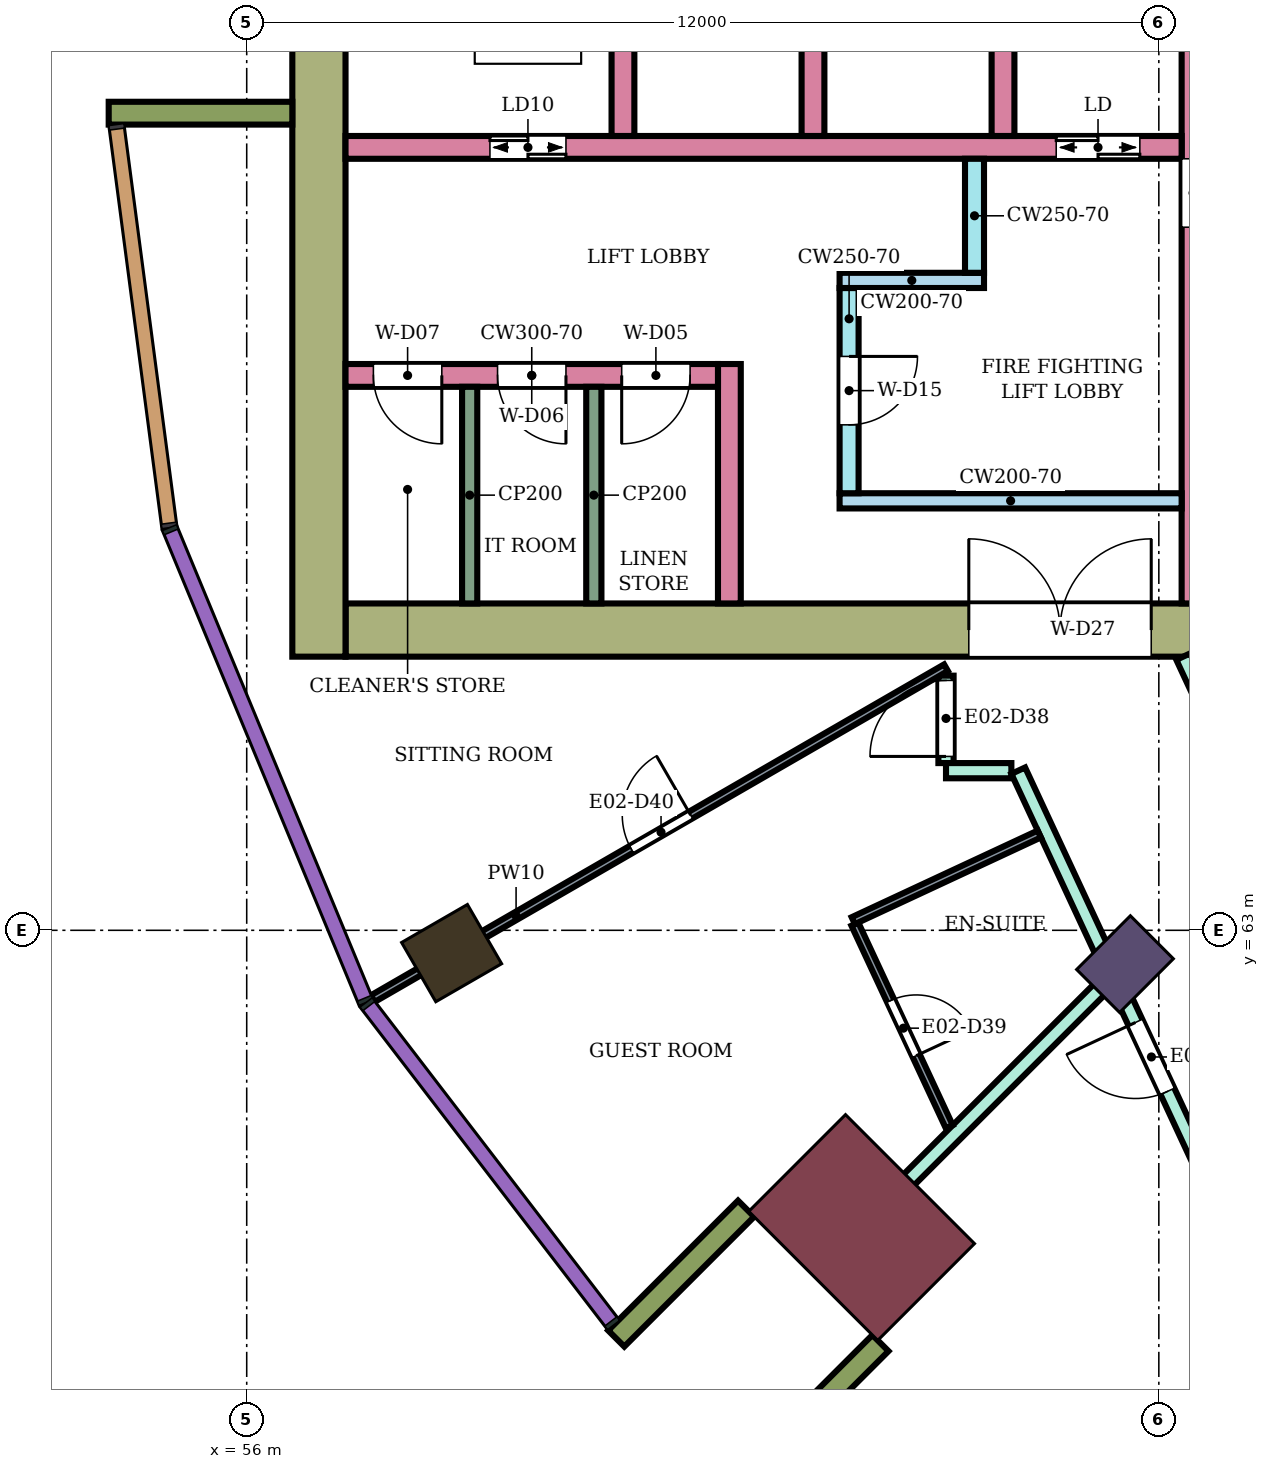
"""IFC4 building model, lengths in metres.
Left out: names, types, materials, properties, quantities, classifications, styles, units other than length and angle.
Written with IfcOpenShell. Run it as: python <this file> out.ifc"""

import sys

from ifc_helpers import new_model, si_unit, direction, frame, frame_2d, origin, origin_2d, place, context, subcontext, project, spatial, rectangle, extrude, element, fill, save


model = new_model("IFC4")
c1 = context("Model", 3, precision=1e-05, world=origin(), true_north=direction((0.0, 1.0)))
c2 = subcontext(c1, "Body", "Model", "MODEL_VIEW")
j1 = project(units=[si_unit("LENGTHUNIT", "METRE"), si_unit("PLANEANGLEUNIT", "RADIAN")], contexts=[c1])
p1 = place(None, origin())
s1 = spatial("IfcSite", under=j1, at=p1, CompositionType="ELEMENT")
p2 = place(p1, origin())
s2 = spatial("IfcBuilding", under=s1, at=p2, CompositionType="ELEMENT")
p3 = place(p2, frame((0.0, 0.0, 126.3)))
s3 = spatial("IfcBuildingStorey", under=s2, at=p3, CompositionType="ELEMENT", Elevation=126.3)
p4 = place(p3, frame((58.696, 62.7, 0.0), z_axis=(0.0, 0.0, 1.0), x_axis=(-0.866025403784, -0.5, 0.0)))
e1 = element("IfcColumn", 1, at=p4, inside=s3, PredefinedType="COLUMN", context=c2, shape_type="SweptSolid", body=[
    extrude(rectangle(XDim=1.0, YDim=0.9, at=origin_2d()), origin(), (0.0, 0.0, 1.0), 3.9),
])
p5 = place(p3, frame((67.555, 62.555, 0.0), z_axis=(0.0, 0.0, 1.0), x_axis=(-0.707106781187, -0.707106781187, 0.0)))
e2 = element("IfcColumn", 2, at=p5, inside=s3, PredefinedType="COLUMN", context=c2, shape_type="SweptSolid", body=[
    extrude(rectangle(XDim=1.0, YDim=0.8, at=origin_2d()), origin(), (0.0, 0.0, 1.0), 3.9),
])
p6 = place(p3, frame((64.09, 59.09, 0.0), z_axis=(0.0, 0.0, 1.0), x_axis=(-0.707106781187, -0.707106781187, 0.0)))
e3 = element("IfcColumn", 3, at=p6, inside=s3, PredefinedType="COLUMN", context=c2, shape_type="SweptSolid", body=[
    extrude(rectangle(XDim=1.8, YDim=2.4, at=origin_2d()), origin(), (0.0, 0.0, 1.0), 3.9),
])
p7 = place(p3, frame((72.1, 66.95, 0.0), z_axis=(0.0, 0.0, 1.0), x_axis=(-1.0, 0.0, 0.0)))
e4 = element("IfcWall", 4, at=p7, inside=s3, PredefinedType="SHEAR", context=c2, shape_type="SweptSolid", body=[
    extrude(rectangle(XDim=14.8, YDim=0.7, at=frame_2d((7.4, 0.0))), origin(), (0.0, 0.0, 1.0), 3.58),
])
p8 = place(p7, frame((4.2, 0.0, 0.0)))
e5 = element("IfcOpeningElement", 5, at=p8, cuts=e4, PredefinedType="OPENING", context=c2, shape_type="SweptSolid", body=[
    extrude(rectangle(XDim=2.4, YDim=2.4, at=frame_2d((1.2, 1.2))), frame((0.0, 0.36, 0.0), z_axis=(0.0, -1.0, 0.0), x_axis=(1.0, 0.0, 0.0)), (0.0, 0.0, 1.0), 0.72),
])
p9 = place(p3, frame((56.95, 83.4, 0.0), z_axis=(0.0, 0.0, 1.0), x_axis=(0.0, -1.0, 0.0)))
e6 = element("IfcWall", 6, at=p9, inside=s3, PredefinedType="SHEAR", context=c2, shape_type="SweptSolid", body=[
    extrude(rectangle(XDim=16.8, YDim=0.7, at=frame_2d((8.4, 0.0))), origin(), (0.0, 0.0, 1.0), 3.58),
])
p10 = place(p3, frame((68.45, 75.0, 0.0), z_axis=(0.0, 0.0, 1.0), x_axis=(0.0, -1.0, 0.0)))
e7 = element("IfcWall", 7, at=p10, inside=s3, PredefinedType="SHEAR", context=c2, shape_type="SweptSolid", body=[
    extrude(rectangle(XDim=7.7, YDim=0.3, at=frame_2d((3.85, 0.0))), origin(), (0.0, 0.0, 1.0), 3.58),
])
p11 = place(p10, frame((1.85, 0.0, 0.0)))
e8 = element("IfcOpeningElement", 8, at=p11, cuts=e7, PredefinedType="OPENING", context=c2, shape_type="SweptSolid", body=[
    extrude(rectangle(XDim=0.9, YDim=2.1, at=frame_2d((0.45, 1.05))), frame((0.0, 0.16, 0.0), z_axis=(0.0, -1.0, 0.0), x_axis=(1.0, 0.0, 0.0)), (0.0, 0.0, 1.0), 0.32),
])
p12 = place(p3, frame((68.3, 73.3, 0.0), z_axis=(0.0, 0.0, 1.0), x_axis=(-1.0, 0.0, 0.0)))
e9 = element("IfcWall", 9, at=p12, inside=s3, PredefinedType="SHEAR", context=c2, shape_type="SweptSolid", body=[
    extrude(rectangle(XDim=11.0, YDim=0.3, at=frame_2d((5.5, 0.0))), origin(), (0.0, 0.0, 1.0), 3.58),
])
p13 = place(p12, frame((0.55, 0.0, 0.0)))
e10 = element("IfcOpeningElement", 10, at=p13, cuts=e9, PredefinedType="OPENING", context=c2, shape_type="SweptSolid", body=[
    extrude(rectangle(XDim=1.1, YDim=2.1, at=frame_2d((0.55, 1.05))), frame((0.0, 0.16, 0.0), z_axis=(0.0, -1.0, 0.0), x_axis=(1.0, 0.0, 0.0)), (0.0, 0.0, 1.0), 0.32),
])
p14 = place(p12, frame((8.1, 0.0, 0.0)))
e11 = element("IfcOpeningElement", 11, at=p14, cuts=e9, PredefinedType="OPENING", context=c2, shape_type="SweptSolid", body=[
    extrude(rectangle(XDim=1.0, YDim=2.1, at=frame_2d((0.5, 1.05))), frame((0.0, 0.16, 0.0), z_axis=(0.0, -1.0, 0.0), x_axis=(1.0, 0.0, 0.0)), (0.0, 0.0, 1.0), 0.32),
])
for number, where, z_axis, x_axis in (
    (12, (65.95, 76.0, 0.0), (0.0, 0.0, 1.0), (0.0, -1.0, 0.0)),
    (13, (63.45, 76.0, 0.0), (0.0, 0.0, 1.0), (0.0, -1.0, 0.0)),
    (14, (60.95, 76.0, 0.0), (0.0, 0.0, 1.0), (0.0, -1.0, 0.0)),
):
    element("IfcWall", number, at=place(p3, frame(where, z_axis=z_axis, x_axis=x_axis)), inside=s3, PredefinedType="SHEAR", context=c2, shape_type="SweptSolid", body=[
        extrude(rectangle(XDim=2.55, YDim=0.3, at=frame_2d((1.275, 0.0))), origin(), (0.0, 0.0, 1.0), 3.58),
    ])
p15 = place(p3, frame((68.3, 68.65, 0.0), z_axis=(0.0, 0.0, 1.0), x_axis=(-1.0, 0.0, 0.0)))
e15 = element("IfcWall", 15, at=p15, inside=s3, PredefinedType="SHEAR", context=c2, shape_type="SweptSolid", body=[
    extrude(rectangle(XDim=4.5, YDim=0.2, at=frame_2d((2.25, 0.0))), origin(), (0.0, 0.0, 1.0), 3.58),
])
p16 = place(p3, frame((63.925, 71.45, 0.0), z_axis=(0.0, 0.0, 1.0), x_axis=(0.0, -1.0, 0.0)))
e16 = element("IfcWall", 16, at=p16, inside=s3, PredefinedType="SHEAR", context=c2, shape_type="SweptSolid", body=[
    extrude(rectangle(XDim=2.7, YDim=0.25, at=frame_2d((1.35, 0.0))), origin(), (0.0, 0.0, 1.0), 3.58),
])
p17 = place(p16, frame((0.9, 0.0, 0.0)))
e17 = element("IfcOpeningElement", 17, at=p17, cuts=e16, PredefinedType="OPENING", context=c2, shape_type="SweptSolid", body=[
    extrude(rectangle(XDim=0.9, YDim=2.1, at=frame_2d((0.45, 1.05))), frame((0.0, 0.135, 0.0), z_axis=(0.0, -1.0, 0.0), x_axis=(1.0, 0.0, 0.0)), (0.0, 0.0, 1.0), 0.27),
])
p18 = place(p3, frame((65.7, 71.55, 0.0), z_axis=(0.0, 0.0, 1.0), x_axis=(-1.0, 0.0, 0.0)))
e18 = element("IfcWall", 18, at=p18, inside=s3, PredefinedType="SHEAR", context=c2, shape_type="SweptSolid", body=[
    extrude(rectangle(XDim=1.9, YDim=0.2, at=frame_2d((0.95, 0.0))), origin(), (0.0, 0.0, 1.0), 3.58),
])
p19 = place(p3, frame((65.575, 73.15, 0.0), z_axis=(0.0, 0.0, 1.0), x_axis=(0.0, -1.0, 0.0)))
e19 = element("IfcWall", 19, at=p19, inside=s3, PredefinedType="SHEAR", context=c2, shape_type="SweptSolid", body=[
    extrude(rectangle(XDim=1.5, YDim=0.25, at=frame_2d((0.75, 0.0))), origin(), (0.0, 0.0, 1.0), 3.58),
])
p20 = place(p3, frame((62.35, 70.45, 0.0), z_axis=(0.0, 0.0, 1.0), x_axis=(0.0, -1.0, 0.0)))
e20 = element("IfcWall", 20, at=p20, inside=s3, PredefinedType="SHEAR", context=c2, shape_type="SweptSolid", body=[
    extrude(rectangle(XDim=3.15, YDim=0.3, at=frame_2d((1.575, 0.0))), origin(), (0.0, 0.0, 1.0), 3.58),
])
p21 = place(p3, frame((62.2, 70.3, 0.0), z_axis=(0.0, 0.0, 1.0), x_axis=(-1.0, 0.0, 0.0)))
e21 = element("IfcWall", 21, at=p21, inside=s3, PredefinedType="SHEAR", context=c2, shape_type="SweptSolid", body=[
    extrude(rectangle(XDim=4.9, YDim=0.3, at=frame_2d((2.45, 0.0))), origin(), (0.0, 0.0, 1.0), 3.58),
])
p22 = place(p21, frame((0.367, 0.0, 0.0)))
e22 = element("IfcOpeningElement", 22, at=p22, cuts=e21, PredefinedType="OPENING", context=c2, shape_type="SweptSolid", body=[
    extrude(rectangle(XDim=0.9, YDim=2.1, at=frame_2d((0.45, 1.05))), frame((0.0, 0.16, 0.0), z_axis=(0.0, -1.0, 0.0), x_axis=(1.0, 0.0, 0.0)), (0.0, 0.0, 1.0), 0.32),
])
p23 = place(p21, frame((2.0, 0.0, 0.0)))
e23 = element("IfcOpeningElement", 23, at=p23, cuts=e21, PredefinedType="OPENING", context=c2, shape_type="SweptSolid", body=[
    extrude(rectangle(XDim=0.9, YDim=2.1, at=frame_2d((0.45, 1.05))), frame((0.0, 0.16, 0.0), z_axis=(0.0, -1.0, 0.0), x_axis=(1.0, 0.0, 0.0)), (0.0, 0.0, 1.0), 0.32),
])
p24 = place(p21, frame((3.633, 0.0, 0.0)))
e24 = element("IfcOpeningElement", 24, at=p24, cuts=e21, PredefinedType="OPENING", context=c2, shape_type="SweptSolid", body=[
    extrude(rectangle(XDim=0.9, YDim=2.1, at=frame_2d((0.45, 1.05))), frame((0.0, 0.16, 0.0), z_axis=(0.0, -1.0, 0.0), x_axis=(1.0, 0.0, 0.0)), (0.0, 0.0, 1.0), 0.32),
])
for number, where, z_axis, x_axis in (
    (25, (56.6, 73.75, 0.0), (0.0, 0.0, 1.0), (-1.0, 0.0, 0.0)),
    (26, (62.57, 59.338, 0.0), (0.0, 0.0, 1.0), (-0.707, -0.707, 0.0)),
    (27, (64.338, 57.57, 0.0), (0.0, 0.0, 1.0), (-0.707, -0.707, 0.0)),
):
    element("IfcWall", number, at=place(p3, frame(where, z_axis=z_axis, x_axis=x_axis)), inside=s3, PredefinedType="NOTDEFINED", context=c2, shape_type="SweptSolid", body=[
        extrude(rectangle(XDim=2.416, YDim=0.3, at=frame_2d((1.208, 0.0))), origin(), (0.0, 0.0, 1.0), 3.9),
    ])
p25 = place(p3, frame((63.592, 58.599, 0.0), z_axis=(0.0, 0.0, 1.0), x_axis=(0.707292886396, 0.706920626982, 0.0)))
e28 = element("IfcWall", 28, at=p25, inside=s3, PredefinedType="PARTITIONING", context=c2, shape_type="SweptSolid", body=[
    extrude(rectangle(XDim=5.247, YDim=0.2, at=frame_2d((2.623, 0.0))), origin(), (0.0, 0.0, 1.0), 3.45),
])
p26 = place(p3, frame((65.2, 65.2, 0.0), z_axis=(0.0, 0.0, 1.0), x_axis=(0.0, 1.0, 0.0)))
e29 = element("IfcWall", 29, at=p26, inside=s3, PredefinedType="PARTITIONING", context=c2, shape_type="SweptSolid", body=[
    extrude(rectangle(XDim=1.15, YDim=0.2, at=frame_2d((0.575, 0.0))), origin(), (0.0, 0.0, 1.0), 3.45),
])
p27 = place(p26, frame((0.087, 0.0, 0.0)))
e30 = element("IfcOpeningElement", 30, at=p27, cuts=e29, PredefinedType="OPENING", context=c2, shape_type="SweptSolid", body=[
    extrude(rectangle(XDim=1.0, YDim=2.1, at=frame_2d((0.5, 1.05))), frame((0.0, 0.11, 0.0), z_axis=(0.0, -1.0, 0.0), x_axis=(1.0, 0.0, 0.0)), (0.0, 0.0, 1.0), 0.22),
])
p28 = place(p3, frame((65.2, 65.1, 0.0), z_axis=(0.0, 0.0, 1.0), x_axis=(1.0, 0.0, 0.0)))
e31 = element("IfcWall", 31, at=p28, inside=s3, PredefinedType="PARTITIONING", context=c2, shape_type="SweptSolid", body=[
    extrude(rectangle(XDim=0.86, YDim=0.2, at=frame_2d((0.43, 0.0))), origin(), (0.0, 0.0, 1.0), 3.45),
])
p29 = place(p3, frame((66.15, 65.1, 0.0), z_axis=(0.0, 0.0, 1.0), x_axis=(0.421814710342, -0.906682055706, 0.0)))
e32 = element("IfcWall", 32, at=p29, inside=s3, PredefinedType="PARTITIONING", context=c2, shape_type="SweptSolid", body=[
    extrude(rectangle(XDim=8.228, YDim=0.2, at=frame_2d((4.114, 0.0))), origin(), (0.0, 0.0, 1.0), 3.45),
])
p30 = place(p29, frame((3.654, 0.0, 0.0)))
e33 = element("IfcOpeningElement", 33, at=p30, cuts=e32, PredefinedType="OPENING", context=c2, shape_type="SweptSolid", body=[
    extrude(rectangle(XDim=1.0, YDim=2.1, at=frame_2d((0.5, 1.05))), frame((0.0, 0.11, 0.0), z_axis=(0.0, -1.0, 0.0), x_axis=(1.0, 0.0, 0.0)), (0.0, 0.0, 1.0), 0.22),
])
p31 = place(p3, frame((68.321, 66.6, 0.0), z_axis=(0.0, 0.0, 1.0), x_axis=(0.421914092414, -0.906635813666, 0.0)))
e34 = element("IfcWall", 34, at=p31, inside=s3, PredefinedType="PARTITIONING", context=c2, shape_type="SweptSolid", body=[
    extrude(rectangle(XDim=7.459, YDim=0.2, at=frame_2d((3.73, 0.0))), origin(), (0.0, 0.0, 1.0), 3.45),
])
p32 = place(p31, frame((0.7, 0.0, 0.0)))
e35 = element("IfcOpeningElement", 35, at=p32, cuts=e34, PredefinedType="OPENING", context=c2, shape_type="SweptSolid", body=[
    extrude(rectangle(XDim=1.0, YDim=2.1, at=frame_2d((0.5, 1.05))), frame((0.0, 0.11, 0.0), z_axis=(0.0, -1.0, 0.0), x_axis=(1.0, 0.0, 0.0)), (0.0, 0.0, 1.0), 0.22),
])
p33 = place(p3, frame((57.659, 62.101, 0.0), z_axis=(0.0, 0.0, 1.0), x_axis=(0.86602264145, 0.500004784474, 0.0)))
e36 = element("IfcWall", 36, at=p33, inside=s3, PredefinedType="PARTITIONING", context=c2, shape_type="SweptSolid", body=[
    extrude(rectangle(XDim=8.708, YDim=0.1, at=frame_2d((4.354, 0.0))), origin(), (0.0, 0.0, 1.0), 3.45),
])
p34 = place(p33, frame((3.929, 0.0, 0.0)))
e37 = element("IfcOpeningElement", 37, at=p34, cuts=e36, PredefinedType="OPENING", context=c2, shape_type="SweptSolid", body=[
    extrude(rectangle(XDim=0.9, YDim=2.1, at=frame_2d((0.45, 1.05))), frame((0.0, 0.06, 0.0), z_axis=(0.0, -1.0, 0.0), x_axis=(1.0, 0.0, 0.0)), (0.0, 0.0, 1.0), 0.12),
])
p35 = place(p3, frame((64.001, 63.082, 0.0), z_axis=(0.0, 0.0, 1.0), x_axis=(0.422271882089, -0.906469225951, 0.0)))
e38 = element("IfcWall", 38, at=p35, inside=s3, PredefinedType="PARTITIONING", context=c2, shape_type="SweptSolid", body=[
    extrude(rectangle(XDim=2.941, YDim=0.1, at=frame_2d((1.471, 0.0))), origin(), (0.0, 0.0, 1.0), 3.45),
])
p36 = place(p35, frame((1.111, 0.0, 0.0)))
e39 = element("IfcOpeningElement", 39, at=p36, cuts=e38, PredefinedType="OPENING", context=c2, shape_type="SweptSolid", body=[
    extrude(rectangle(XDim=0.8, YDim=2.1, at=frame_2d((0.4, 1.05))), frame((0.0, 0.06, 0.0), z_axis=(0.0, -1.0, 0.0), x_axis=(1.0, 0.0, 0.0)), (0.0, 0.0, 1.0), 0.12),
])
p37 = place(p3, frame((63.98, 63.127, 0.0), z_axis=(0.0, 0.0, 1.0), x_axis=(0.90649017149, 0.422226916469, 0.0)))
e40 = element("IfcWall", 40, at=p37, inside=s3, PredefinedType="PARTITIONING", context=c2, shape_type="SweptSolid", body=[
    extrude(rectangle(XDim=2.7, YDim=0.1, at=frame_2d((1.35, 0.0))), origin(), (0.0, 0.0, 1.0), 3.45),
])
for number, where, z_axis, x_axis in (
    (41, (60.567, 70.15, 0.0), (0.0, 0.0, 1.0), (0.0, -1.0, 0.0)),
    (42, (58.933, 70.15, 0.0), (0.0, 0.0, 1.0), (0.0, -1.0, 0.0)),
):
    element("IfcWall", number, at=place(p3, frame(where, z_axis=z_axis, x_axis=x_axis)), inside=s3, PredefinedType="PARTITIONING", context=c2, shape_type="SweptSolid", body=[
        extrude(rectangle(XDim=2.85, YDim=0.2, at=frame_2d((1.425, 0.0))), origin(), (0.0, 0.0, 1.0), 3.58),
    ])
p38 = place(p30, frame((1.0, 0.0, 0.0), z_axis=(0.0, 0.0, 1.0), x_axis=(-1.0, 0.0, 0.0)))
e43 = element("IfcDoor", 43, at=p38, inside=s3, OperationType="SINGLE_SWING_RIGHT", PredefinedType="DOOR", context=c2, shape_type="SweptSolid", body=[
    extrude(rectangle(XDim=1.0, YDim=2.1, at=frame_2d((0.5, 1.05))), frame((0.0, 0.025, 0.0), z_axis=(0.0, -1.0, 0.0), x_axis=(1.0, 0.0, 0.0)), (0.0, 0.0, 1.0), 0.05),
])
fill(e33, e43)
p39 = place(p27, origin())
e44 = element("IfcDoor", 44, at=p39, inside=s3, OperationType="SINGLE_SWING_LEFT", PredefinedType="DOOR", context=c2, shape_type="SweptSolid", body=[
    extrude(rectangle(XDim=1.0, YDim=2.1, at=frame_2d((0.5, 1.05))), frame((0.0, 0.025, 0.0), z_axis=(0.0, -1.0, 0.0), x_axis=(1.0, 0.0, 0.0)), (0.0, 0.0, 1.0), 0.05),
])
fill(e30, e44)
p40 = place(p36, origin())
e45 = element("IfcDoor", 45, at=p40, inside=s3, OperationType="SINGLE_SWING_RIGHT", PredefinedType="DOOR", context=c2, shape_type="SweptSolid", body=[
    extrude(rectangle(XDim=0.8, YDim=2.1, at=frame_2d((0.4, 1.05))), frame((0.0, 0.025, 0.0), z_axis=(0.0, -1.0, 0.0), x_axis=(1.0, 0.0, 0.0)), (0.0, 0.0, 1.0), 0.05),
])
fill(e39, e45)
p41 = place(p34, origin())
e46 = element("IfcDoor", 46, at=p41, inside=s3, OperationType="SINGLE_SWING_RIGHT", PredefinedType="DOOR", context=c2, shape_type="SweptSolid", body=[
    extrude(rectangle(XDim=0.9, YDim=2.1, at=frame_2d((0.45, 1.05))), frame((0.0, 0.025, 0.0), z_axis=(0.0, -1.0, 0.0), x_axis=(1.0, 0.0, 0.0)), (0.0, 0.0, 1.0), 0.05),
])
fill(e37, e46)
p42 = place(p13, origin())
e47 = element("IfcDoor", 47, at=p42, inside=s3, OperationType="DOUBLE_DOOR_SLIDING", PredefinedType="DOOR", context=c2, shape_type="SweptSolid", body=[
    extrude(rectangle(XDim=1.1, YDim=2.1, at=frame_2d((0.55, 1.05))), frame((0.0, 0.025, 0.0), z_axis=(0.0, -1.0, 0.0), x_axis=(1.0, 0.0, 0.0)), (0.0, 0.0, 1.0), 0.05),
])
fill(e10, e47)
p43 = place(p14, origin())
e48 = element("IfcDoor", 48, at=p43, inside=s3, OperationType="DOUBLE_DOOR_SLIDING", PredefinedType="DOOR", context=c2, shape_type="SweptSolid", body=[
    extrude(rectangle(XDim=1.0, YDim=2.1, at=frame_2d((0.5, 1.05))), frame((0.0, 0.025, 0.0), z_axis=(0.0, -1.0, 0.0), x_axis=(1.0, 0.0, 0.0)), (0.0, 0.0, 1.0), 0.05),
])
fill(e11, e48)
p44 = place(p17, origin())
e49 = element("IfcDoor", 49, at=p44, inside=s3, OperationType="SINGLE_SWING_LEFT", PredefinedType="DOOR", context=c2, shape_type="SweptSolid", body=[
    extrude(rectangle(XDim=0.9, YDim=2.1, at=frame_2d((0.45, 1.05))), frame((0.0, 0.025, 0.0), z_axis=(0.0, -1.0, 0.0), x_axis=(1.0, 0.0, 0.0)), (0.0, 0.0, 1.0), 0.05),
])
fill(e17, e49)
p45 = place(p22, origin())
e50 = element("IfcDoor", 50, at=p45, inside=s3, OperationType="SINGLE_SWING_RIGHT", PredefinedType="DOOR", context=c2, shape_type="SweptSolid", body=[
    extrude(rectangle(XDim=0.9, YDim=2.1, at=frame_2d((0.45, 1.05))), frame((0.0, 0.025, 0.0), z_axis=(0.0, -1.0, 0.0), x_axis=(1.0, 0.0, 0.0)), (0.0, 0.0, 1.0), 0.05),
])
fill(e22, e50)
p46 = place(p23, origin())
e51 = element("IfcDoor", 51, at=p46, inside=s3, OperationType="SINGLE_SWING_LEFT", PredefinedType="DOOR", context=c2, shape_type="SweptSolid", body=[
    extrude(rectangle(XDim=0.9, YDim=2.1, at=frame_2d((0.45, 1.05))), frame((0.0, 0.025, 0.0), z_axis=(0.0, -1.0, 0.0), x_axis=(1.0, 0.0, 0.0)), (0.0, 0.0, 1.0), 0.05),
])
fill(e23, e51)
p47 = place(p24, origin())
e52 = element("IfcDoor", 52, at=p47, inside=s3, OperationType="SINGLE_SWING_LEFT", PredefinedType="DOOR", context=c2, shape_type="SweptSolid", body=[
    extrude(rectangle(XDim=0.9, YDim=2.1, at=frame_2d((0.45, 1.05))), frame((0.0, 0.025, 0.0), z_axis=(0.0, -1.0, 0.0), x_axis=(1.0, 0.0, 0.0)), (0.0, 0.0, 1.0), 0.05),
])
fill(e24, e52)
p48 = place(p8, frame((2.4, 0.0, 0.0), z_axis=(0.0, 0.0, 1.0), x_axis=(-1.0, 0.0, 0.0)))
e53 = element("IfcDoor", 53, at=p48, inside=s3, OperationType="DOUBLE_DOOR_SINGLE_SWING", PredefinedType="DOOR", context=c2, shape_type="SweptSolid", body=[
    extrude(rectangle(XDim=2.4, YDim=2.4, at=frame_2d((1.2, 1.2))), frame((0.0, 0.025, 0.0), z_axis=(0.0, -1.0, 0.0), x_axis=(1.0, 0.0, 0.0)), (0.0, 0.0, 1.0), 0.05),
])
fill(e5, e53)
save(model, sys.argv[1])
